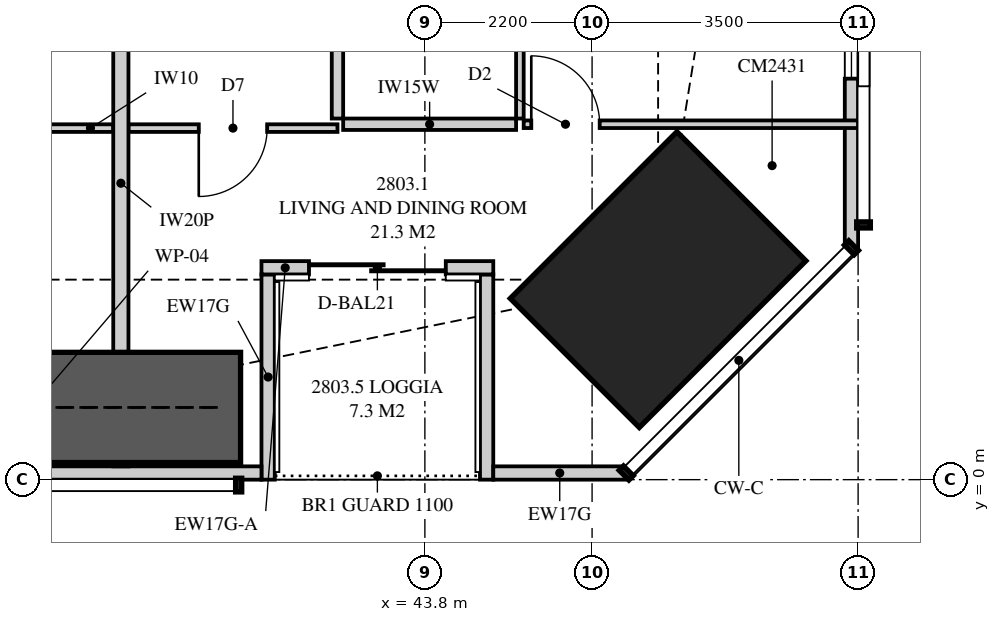
"""IFC4 building model, lengths in metres.
Left out: names, types, materials, properties, quantities, classifications, styles, units other than length and angle.
Written with IfcOpenShell. Run it as: python <this file> out.ifc"""

import sys

from ifc_helpers import new_model, si_unit, direction, frame, frame_2d, origin, origin_2d, place, context, subcontext, project, spatial, polyline, rectangle, outline, extrude, element, fill, save


model = new_model("IFC4")
c1 = context("Model", 3, precision=1e-05, world=origin(), true_north=direction((0.0, 1.0)))
c2 = subcontext(c1, "Body", "Model", "MODEL_VIEW")
j1 = project(units=[si_unit("LENGTHUNIT", "METRE"), si_unit("PLANEANGLEUNIT", "RADIAN")], contexts=[c1])
p1 = place(None, origin())
s1 = spatial("IfcSite", under=j1, at=p1, CompositionType="ELEMENT")
p2 = place(p1, origin())
s2 = spatial("IfcBuilding", under=s1, at=p2, CompositionType="ELEMENT")
p3 = place(p2, frame((0.0, 0.0, 104.85)))
s3 = spatial("IfcBuildingStorey", under=s2, at=p3, CompositionType="ELEMENT", Elevation=104.85)
p4 = place(p3, frame((46.869, 2.631, 0.0), z_axis=(0.0, 0.0, 1.0), x_axis=(-0.707106781187, 0.707106781187, 0.0)))
e1 = element("IfcColumn", 1, at=p4, inside=s3, PredefinedType="COLUMN", context=c2, shape_type="SweptSolid", body=[
    extrude(rectangle(XDim=2.4, YDim=3.1, at=origin_2d()), origin(), (0.0, 0.0, 1.0), 3.35),
])
p5 = place(p3, frame((33.9, 0.087, 0.0), z_axis=(0.0, 0.0, 1.0), x_axis=(1.0, 0.0, 0.0)))
e2 = element("IfcWall", 2, at=p5, inside=s3, PredefinedType="SOLIDWALL", context=c2, shape_type="SweptSolid", body=[
    extrude(outline(polyline([(0.0, 0.0), (7.75, 0.0), (7.75, 3.11), (4.928, 3.11), (4.928, 2.15), (4.883, 2.15), (4.883, 3.11), (4.725, 3.11), (4.725, 2.15), (0.0, 2.15), (0.0, 0.0)])), frame((0.0, 0.087, 0.0), z_axis=(0.0, -1.0, 0.0), x_axis=(1.0, 0.0, 0.0)), (0.0, 0.0, 1.0), 0.175),
])
p6 = place(p5, frame((0.64, 0.0, 0.4)))
e3 = element("IfcOpeningElement", 3, at=p6, cuts=e2, PredefinedType="OPENING", context=c2, shape_type="SweptSolid", body=[
    extrude(rectangle(XDim=1.2, YDim=1.7, at=frame_2d((0.6, 0.85))), frame((0.0, 0.097, 0.0), z_axis=(0.0, -1.0, 0.0), x_axis=(1.0, 0.0, 0.0)), (0.0, 0.0, 1.0), 0.195),
])
p7 = place(p3, frame((44.7, 0.087, 0.0), z_axis=(0.0, 0.0, 1.0), x_axis=(1.0, 0.0, 0.0)))
e4 = element("IfcWall", 4, at=p7, inside=s3, PredefinedType="SOLIDWALL", context=c2, shape_type="SweptSolid", body=[
    extrude(rectangle(XDim=1.749, YDim=0.175, at=frame_2d((0.875, 0.0))), origin(), (0.0, 0.0, 1.0), 3.11),
])
p8 = place(p3, frame((41.65, 2.788, 0.0), z_axis=(0.0, 0.0, 1.0), x_axis=(1.0, 0.0, 0.0)))
e5 = element("IfcWall", 5, at=p8, inside=s3, PredefinedType="SOLIDWALL", context=c2, shape_type="SweptSolid", body=[
    extrude(rectangle(XDim=0.625, YDim=0.175, at=frame_2d((0.312, 0.0))), origin(), (0.0, 0.0, 1.0), 2.51),
])
p9 = place(p3, frame((42.275, 2.788, 0.0), z_axis=(0.0, 0.0, 1.0), x_axis=(1.0, 0.0, 0.0)))
e6 = element("IfcWall", 6, at=p9, inside=s3, PredefinedType="SOLIDWALL", context=c2, shape_type="SweptSolid", body=[
    extrude(rectangle(XDim=2.425, YDim=0.175, at=frame_2d((1.212, 0.0))), origin(), (0.0, 0.0, 1.0), 2.15),
])
p10 = place(p9, origin())
e7 = element("IfcOpeningElement", 7, at=p10, cuts=e6, PredefinedType="OPENING", context=c2, shape_type="SweptSolid", body=[
    extrude(rectangle(XDim=1.8, YDim=2.1, at=frame_2d((0.9, 1.05))), frame((0.0, 0.097, 0.0), z_axis=(0.0, -1.0, 0.0), x_axis=(1.0, 0.0, 0.0)), (0.0, 0.0, 1.0), 0.195),
])
p11 = place(p3, frame((41.738, 0.0, 0.0), z_axis=(0.0, 0.0, 1.0), x_axis=(0.0, 1.0, 0.0)))
e8 = element("IfcWall", 8, at=p11, inside=s3, PredefinedType="SOLIDWALL", context=c2, shape_type="SweptSolid", body=[
    extrude(outline(polyline([(0.0, 0.0), (2.7, 0.0), (2.7, 2.51), (2.419, 2.51), (2.419, 2.15), (0.75, 2.15), (0.75, 3.11), (0.0, 3.11), (0.0, 0.0)])), frame((0.0, 0.087, 0.0), z_axis=(0.0, -1.0, 0.0), x_axis=(1.0, 0.0, 0.0)), (0.0, 0.0, 1.0), 0.175),
])
p12 = place(p3, frame((44.613, 0.0, 0.0), z_axis=(0.0, 0.0, 1.0), x_axis=(0.0, 1.0, 0.0)))
e9 = element("IfcWall", 9, at=p12, inside=s3, PredefinedType="SOLIDWALL", context=c2, shape_type="SweptSolid", body=[
    extrude(outline(polyline([(0.0, 0.0), (2.7, 0.0), (2.7, 2.15), (1.337, 2.15), (1.337, 3.11), (0.0, 3.11), (0.0, 0.0)])), frame((0.0, 0.087, 0.0), z_axis=(0.0, -1.0, 0.0), x_axis=(1.0, 0.0, 0.0)), (0.0, 0.0, 1.0), 0.175),
])
p13 = place(p3, frame((49.413, 3.051, 0.0), z_axis=(0.0, 0.0, 1.0), x_axis=(0.0, 1.0, 0.0)))
e10 = element("IfcWall", 10, at=p13, inside=s3, PredefinedType="SOLIDWALL", context=c2, shape_type="SweptSolid", body=[
    extrude(outline(polyline([(0.0, 0.0), (31.897, 0.0), (31.897, 3.11), (22.167, 3.11), (22.167, 2.15), (22.074, 2.15), (22.074, 3.11), (21.949, 3.11), (21.949, 2.15), (9.949, 2.15), (9.949, 3.11), (9.823, 3.11), (9.823, 2.15), (9.73, 2.15), (9.73, 3.11), (0.0, 3.11), (0.0, 0.0)])), frame((0.0, 0.087, 0.0), z_axis=(0.0, -1.0, 0.0), x_axis=(1.0, 0.0, 0.0)), (0.0, 0.0, 1.0), 0.175),
])
p14 = place(p13, frame((2.224, 0.0, 0.4)))
e11 = element("IfcOpeningElement", 11, at=p14, cuts=e10, PredefinedType="OPENING", context=c2, shape_type="SweptSolid", body=[
    extrude(rectangle(XDim=1.8, YDim=1.7, at=frame_2d((0.9, 0.85))), frame((0.0, 0.097, 0.0), z_axis=(0.0, -1.0, 0.0), x_axis=(1.0, 0.0, 0.0)), (0.0, 0.0, 1.0), 0.195),
])
p15 = place(p13, frame((14.849, 0.0, 0.4)))
e12 = element("IfcOpeningElement", 12, at=p15, cuts=e10, PredefinedType="OPENING", context=c2, shape_type="SweptSolid", body=[
    extrude(rectangle(XDim=1.2, YDim=1.7, at=frame_2d((0.6, 0.85))), frame((0.0, 0.097, 0.0), z_axis=(0.0, -1.0, 0.0), x_axis=(1.0, 0.0, 0.0)), (0.0, 0.0, 1.0), 0.195),
])
p16 = place(p13, frame((28.51, 0.0, 0.4)))
e13 = element("IfcOpeningElement", 13, at=p16, cuts=e10, PredefinedType="OPENING", context=c2, shape_type="SweptSolid", body=[
    extrude(rectangle(XDim=1.2, YDim=1.7, at=frame_2d((0.6, 0.85))), frame((0.0, 0.097, 0.0), z_axis=(0.0, -1.0, 0.0), x_axis=(1.0, 0.0, 0.0)), (0.0, 0.0, 1.0), 0.195),
])
p17 = place(p3, frame((39.8, 0.175, 0.0), z_axis=(0.0, 0.0, 1.0), x_axis=(0.0, 1.0, 0.0)))
e14 = element("IfcWall", 14, at=p17, inside=s3, PredefinedType="PARTITIONING", context=c2, shape_type="SweptSolid", body=[
    extrude(outline(polyline([(0.086, 3.11), (0.0, 3.11), (0.0, 0.0), (0.529, 0.0), (0.529, 0.701), (1.021, 0.701), (1.021, 0.0), (7.45, 0.0), (7.45, 3.11), (3.766, 3.11), (3.766, 2.51), (1.943, 2.51), (1.943, 2.15), (1.021, 2.15), (1.021, 1.449), (0.529, 1.449), (0.529, 2.15), (0.086, 2.15), (0.086, 3.11)])), frame((0.0, 0.1, 0.0), z_axis=(0.0, -1.0, 0.0), x_axis=(1.0, 0.0, 0.0)), (0.0, 0.0, 1.0), 0.2),
])
p18 = place(p3, frame((36.15, 4.625, 0.0), z_axis=(0.0, 0.0, 1.0), x_axis=(1.0, 0.0, 0.0)))
e15 = element("IfcWall", 15, at=p18, inside=s3, PredefinedType="PARTITIONING", context=c2, shape_type="SweptSolid", body=[
    extrude(outline(polyline([(0.0, 0.0), (3.55, 0.0), (3.55, 3.11), (2.762, 3.11), (2.762, 2.541), (2.188, 2.541), (2.188, 3.11), (0.0, 3.11), (0.0, 0.0)])), frame((0.0, 0.05, 0.0), z_axis=(0.0, -1.0, 0.0), x_axis=(1.0, 0.0, 0.0)), (0.0, 0.0, 1.0), 0.1),
])
p19 = place(p18, frame((1.3, 0.0, 0.0)))
e16 = element("IfcOpeningElement", 16, at=p19, cuts=e15, PredefinedType="OPENING", context=c2, shape_type="SweptSolid", body=[
    extrude(rectangle(XDim=0.9, YDim=2.1, at=frame_2d((0.45, 1.05))), frame((0.0, 0.06, 0.0), z_axis=(0.0, -1.0, 0.0), x_axis=(1.0, 0.0, 0.0)), (0.0, 0.0, 1.0), 0.12),
])
p20 = place(p3, frame((45.05, 4.751, 0.0), z_axis=(0.0, 0.0, 1.0), x_axis=(0.0, 1.0, 0.0)))
e17 = element("IfcWall", 17, at=p20, inside=s3, PredefinedType="PARTITIONING", context=c2, shape_type="SweptSolid", body=[
    extrude(rectangle(XDim=2.874, YDim=0.1, at=frame_2d((1.437, 0.0))), origin(), (0.0, 0.0, 1.0), 3.11),
])
p21 = place(p20, frame((0.949, 0.0, 0.0)))
e18 = element("IfcOpeningElement", 18, at=p21, cuts=e17, PredefinedType="OPENING", context=c2, shape_type="SweptSolid", body=[
    extrude(rectangle(XDim=0.9, YDim=2.1, at=frame_2d((0.45, 1.05))), frame((0.0, 0.06, 0.0), z_axis=(0.0, -1.0, 0.0), x_axis=(1.0, 0.0, 0.0)), (0.0, 0.0, 1.0), 0.12),
])
p22 = place(p3, frame((45.1, 4.676, 0.0), z_axis=(0.0, 0.0, 1.0), x_axis=(1.0, 0.0, 0.0)))
e19 = element("IfcWall", 19, at=p22, inside=s3, PredefinedType="PARTITIONING", context=c2, shape_type="SweptSolid", body=[
    extrude(outline(polyline([(0.0, 0.0), (4.4, 0.0), (4.4, 3.11), (2.971, 3.11), (2.971, 2.15), (1.229, 2.15), (1.229, 3.11), (0.0, 3.11), (0.0, 0.0)])), frame((0.0, 0.05, 0.0), z_axis=(0.0, -1.0, 0.0), x_axis=(1.0, 0.0, 0.0)), (0.0, 0.0, 1.0), 0.1),
])
p23 = place(p22, frame((0.1, 0.0, 0.0)))
e20 = element("IfcOpeningElement", 20, at=p23, cuts=e19, PredefinedType="OPENING", context=c2, shape_type="SweptSolid", body=[
    extrude(rectangle(XDim=0.9, YDim=2.1, at=frame_2d((0.45, 1.05))), frame((0.0, 0.06, 0.0), z_axis=(0.0, -1.0, 0.0), x_axis=(1.0, 0.0, 0.0)), (0.0, 0.0, 1.0), 0.12),
])
p24 = place(p3, frame((42.725, 4.676, 0.0), z_axis=(0.0, 0.0, 1.0), x_axis=(1.0, 0.0, 0.0)))
e21 = element("IfcWall", 21, at=p24, inside=s3, PredefinedType="PLUMBINGWALL", context=c2, shape_type="SweptSolid", body=[
    extrude(rectangle(XDim=2.275, YDim=0.15, at=frame_2d((1.137, 0.0))), origin(), (0.0, 0.0, 1.0), 3.11),
])
p25 = place(p3, frame((42.65, 4.751, 0.0), z_axis=(0.0, 0.0, 1.0), x_axis=(0.0, 1.0, 0.0)))
e22 = element("IfcWall", 22, at=p25, inside=s3, PredefinedType="PLUMBINGWALL", context=c2, shape_type="SweptSolid", body=[
    extrude(rectangle(XDim=2.874, YDim=0.15, at=frame_2d((1.437, 0.0))), origin(), (0.0, 0.0, 1.0), 3.11),
])
p26 = place(p3, frame((39.9, 4.625, 0.0), z_axis=(0.0, 0.0, 1.0), x_axis=(1.0, 0.0, 0.0)))
e23 = element("IfcWall", 23, at=p26, inside=s3, PredefinedType="PARTITIONING", context=c2, shape_type="SweptSolid", body=[
    extrude(rectangle(XDim=2.75, YDim=0.1, at=frame_2d((1.375, 0.0))), origin(), (0.0, 0.0, 1.0), 3.11),
])
p27 = place(p26, frame((0.925, 0.0, 0.0)))
e24 = element("IfcOpeningElement", 24, at=p27, cuts=e23, PredefinedType="OPENING", context=c2, shape_type="SweptSolid", body=[
    extrude(rectangle(XDim=0.9, YDim=2.1, at=frame_2d((0.45, 1.05))), frame((0.0, 0.06, 0.0), z_axis=(0.0, -1.0, 0.0), x_axis=(1.0, 0.0, 0.0)), (0.0, 0.0, 1.0), 0.12),
])
p28 = place(p3, frame((35.875, 0.95, 0.0), z_axis=(0.0, 0.0, 1.0), x_axis=(1.0, 0.0, 0.0)))
e25 = element("IfcWall", 25, at=p28, inside=s3, PredefinedType="SHEAR", context=c2, shape_type="SweptSolid", body=[
    extrude(rectangle(XDim=5.5, YDim=1.45, at=frame_2d((2.75, 0.0))), origin(), (0.0, 0.0, 1.0), 3.35),
])
p29 = place(p10, origin())
e26 = element("IfcDoor", 26, at=p29, inside=s3, OperationType="SLIDING_TO_LEFT", PredefinedType="DOOR", context=c2, shape_type="SweptSolid", body=[
    extrude(rectangle(XDim=1.8, YDim=2.1, at=frame_2d((0.9, 1.05))), frame((0.0, 0.025, 0.0), z_axis=(0.0, -1.0, 0.0), x_axis=(1.0, 0.0, 0.0)), (0.0, 0.0, 1.0), 0.05),
])
fill(e7, e26)
p30 = place(p14, origin())
e27 = element("IfcWindow", 27, at=p30, inside=s3, PartitioningType="SINGLE_PANEL", PredefinedType="WINDOW", context=c2, shape_type="SweptSolid", body=[
    extrude(rectangle(XDim=1.8, YDim=1.7, at=frame_2d((0.9, 0.85))), frame((0.0, 0.03, 0.0), z_axis=(0.0, -1.0, 0.0), x_axis=(1.0, 0.0, 0.0)), (0.0, 0.0, 1.0), 0.06),
])
fill(e11, e27)
p31 = place(p23, origin())
e28 = element("IfcDoor", 28, at=p31, inside=s3, OperationType="SINGLE_SWING_LEFT", PredefinedType="DOOR", context=c2, shape_type="SweptSolid", body=[
    extrude(rectangle(XDim=0.9, YDim=2.1, at=frame_2d((0.45, 1.05))), frame((0.0, 0.025, 0.0), z_axis=(0.0, -1.0, 0.0), x_axis=(1.0, 0.0, 0.0)), (0.0, 0.0, 1.0), 0.05),
])
fill(e20, e28)
p32 = place(p27, frame((0.9, 0.0, 0.0), z_axis=(0.0, 0.0, 1.0), x_axis=(-1.0, 0.0, 0.0)))
e29 = element("IfcDoor", 29, at=p32, inside=s3, OperationType="SINGLE_SWING_RIGHT", PredefinedType="DOOR", context=c2, shape_type="SweptSolid", body=[
    extrude(rectangle(XDim=0.9, YDim=2.1, at=frame_2d((0.45, 1.05))), frame((0.0, 0.025, 0.0), z_axis=(0.0, -1.0, 0.0), x_axis=(1.0, 0.0, 0.0)), (0.0, 0.0, 1.0), 0.05),
])
fill(e24, e29)
save(model, sys.argv[1])
